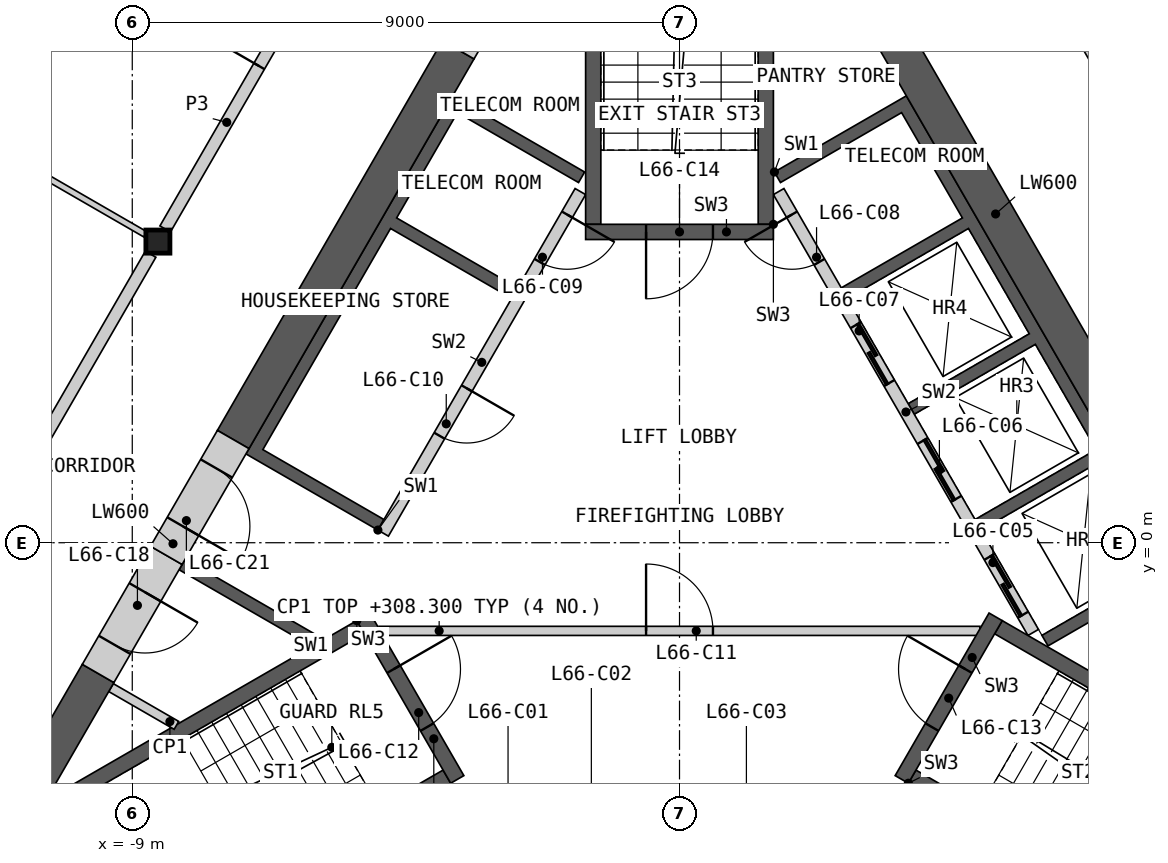
"""IFC4 building model, lengths in metres.
Left out: names, types, materials, properties, quantities, classifications, styles, units other than length and angle.
Written with IfcOpenShell. Run it as: python <this file> out.ifc"""

import sys

from ifc_helpers import new_model, si_unit, direction, frame, frame_2d, origin, origin_2d, place, context, subcontext, project, spatial, polyline, rectangle, i_section, outline, extrude, element, fill, save


model = new_model("IFC4")
c1 = context("Model", 3, precision=1e-05, world=origin(), true_north=direction((0.0, 1.0)))
c2 = subcontext(c1, "Body", "Model", "MODEL_VIEW")
j1 = project(units=[si_unit("LENGTHUNIT", "METRE"), si_unit("PLANEANGLEUNIT", "RADIAN")], contexts=[c1])
p1 = place(None, origin())
s1 = spatial("IfcSite", under=j1, at=p1, CompositionType="ELEMENT")
p2 = place(p1, origin())
s2 = spatial("IfcBuilding", under=s1, at=p2, CompositionType="ELEMENT")
p3 = place(p2, frame((0.0, 0.0, 305.2)))
s3 = spatial("IfcBuildingStorey", under=s2, at=p3, CompositionType="ELEMENT", Elevation=305.2)
p4 = place(p3, frame((-8.578, 4.953, 0.0), z_axis=(0.0, 0.0, 1.0), x_axis=(1.0, 0.0, 0.0)))
e1 = element("IfcColumn", 1, at=p4, inside=s3, PredefinedType="COLUMN", context=c2, shape_type="SweptSolid", body=[
    extrude(i_section(OverallWidth=0.396, OverallDepth=0.381, WebThickness=0.019, FlangeThickness=0.03, at=origin_2d()), origin(), (0.0, 0.0, 1.0), 3.4),
])
p5 = place(p3, origin())
e2 = element("IfcWall", 2, at=p5, inside=s3, PredefinedType="SHEAR", context=c2, shape_type="SweptSolid", body=[
    extrude(outline(polyline([(1.561, 6.097), (3.731, 7.35), (8.231, -0.444), (6.061, -1.697), (5.96, -1.524), (7.952, -0.374), (6.952, 1.358), (4.96, 0.208), (4.861, 0.381), (6.852, 1.531), (5.852, 3.263), (3.861, 2.113), (3.76, 2.287), (5.752, 3.437), (4.752, 5.169), (2.76, 4.019), (2.66, 4.192), (4.652, 5.342), (3.652, 7.074), (1.66, 5.924), (1.561, 6.097)])), origin(), (0.0, 0.0, 1.0), 3.1),
])
p6 = place(p3, frame((5.817, -1.476, 0.0), z_axis=(0.0, 0.0, 1.0), x_axis=(-0.500002616675, 0.866023893041, 0.0)))
e3 = element("IfcWall", 3, at=p6, inside=s3, PredefinedType="SOLIDWALL", context=c2, shape_type="SweptSolid", body=[
    extrude(rectangle(XDim=8.373, YDim=0.2, at=frame_2d((4.187, 0.0))), origin(), (0.0, 0.0, 1.0), 3.1),
])
p7 = place(p6, frame((0.337, 0.0, 0.0)))
e4 = element("IfcOpeningElement", 4, at=p7, cuts=e3, PredefinedType="OPENING", context=c2, shape_type="SweptSolid", body=[
    extrude(rectangle(XDim=1.1, YDim=2.1, at=frame_2d((0.55, 1.05))), frame((0.0, 0.11, 0.0), z_axis=(0.0, -1.0, 0.0), x_axis=(1.0, 0.0, 0.0)), (0.0, 0.0, 1.0), 0.22),
])
p8 = place(p6, frame((2.537, 0.0, 0.0)))
e5 = element("IfcOpeningElement", 5, at=p8, cuts=e3, PredefinedType="OPENING", context=c2, shape_type="SweptSolid", body=[
    extrude(rectangle(XDim=1.1, YDim=2.1, at=frame_2d((0.55, 1.05))), frame((0.0, 0.11, 0.0), z_axis=(0.0, -1.0, 0.0), x_axis=(1.0, 0.0, 0.0)), (0.0, 0.0, 1.0), 0.22),
])
p9 = place(p6, frame((4.737, 0.0, 0.0)))
e6 = element("IfcOpeningElement", 6, at=p9, cuts=e3, PredefinedType="OPENING", context=c2, shape_type="SweptSolid", body=[
    extrude(rectangle(XDim=1.1, YDim=2.1, at=frame_2d((0.55, 1.05))), frame((0.0, 0.11, 0.0), z_axis=(0.0, -1.0, 0.0), x_axis=(1.0, 0.0, 0.0)), (0.0, 0.0, 1.0), 0.22),
])
p10 = place(p6, frame((7.037, 0.0, 0.0)))
e7 = element("IfcOpeningElement", 7, at=p10, cuts=e3, PredefinedType="OPENING", context=c2, shape_type="SweptSolid", body=[
    extrude(rectangle(XDim=0.9, YDim=2.1, at=frame_2d((0.45, 1.05))), frame((0.0, 0.11, 0.0), z_axis=(0.0, -1.0, 0.0), x_axis=(1.0, 0.0, 0.0)), (0.0, 0.0, 1.0), 0.22),
])
p11 = place(p3, origin())
e8 = element("IfcWall", 8, at=p11, inside=s3, PredefinedType="SHEAR", context=c2, shape_type="SweptSolid", body=[
    extrude(outline(polyline([(-6.061, -1.697), (-8.231, -0.444), (-8.131, -0.271), (-5.96, -1.524), (-6.061, -1.697)])), origin(), (0.0, 0.0, 1.0), 3.1),
])
p12 = place(p3, origin())
e9 = element("IfcWall", 9, at=p12, inside=s3, PredefinedType="SHEAR", context=c2, shape_type="SweptSolid", body=[
    extrude(outline(polyline([(-4.96, 0.208), (-7.131, 1.461), (-3.731, 7.35), (-1.561, 6.097), (-1.66, 5.924), (-3.652, 7.074), (-4.652, 5.342), (-2.66, 4.192), (-2.76, 4.019), (-4.752, 5.169), (-6.852, 1.531), (-4.861, 0.381), (-4.96, 0.208)])), origin(), (0.0, 0.0, 1.0), 3.1),
])
p13 = place(p3, frame((-1.631, 5.776, 0.0), z_axis=(0.0, 0.0, 1.0), x_axis=(-0.499992876559, -0.866029516466, 0.0)))
e10 = element("IfcWall", 10, at=p13, inside=s3, PredefinedType="SOLIDWALL", context=c2, shape_type="SweptSolid", body=[
    extrude(rectangle(XDim=6.486, YDim=0.2, at=frame_2d((3.243, 0.0))), origin(), (0.0, 0.0, 1.0), 3.1),
])
p14 = place(p13, frame((0.437, 0.0, 0.0)))
e11 = element("IfcOpeningElement", 11, at=p14, cuts=e10, PredefinedType="OPENING", context=c2, shape_type="SweptSolid", body=[
    extrude(rectangle(XDim=0.9, YDim=2.1, at=frame_2d((0.45, 1.05))), frame((0.0, 0.11, 0.0), z_axis=(0.0, -1.0, 0.0), x_axis=(1.0, 0.0, 0.0)), (0.0, 0.0, 1.0), 0.22),
])
p15 = place(p13, frame((3.737, 0.0, 0.0)))
e12 = element("IfcOpeningElement", 12, at=p15, cuts=e10, PredefinedType="OPENING", context=c2, shape_type="SweptSolid", body=[
    extrude(rectangle(XDim=0.9, YDim=2.1, at=frame_2d((0.45, 1.05))), frame((0.0, 0.11, 0.0), z_axis=(0.0, -1.0, 0.0), x_axis=(1.0, 0.0, 0.0)), (0.0, 0.0, 1.0), 0.22),
])
p16 = place(p3, frame((-4.941, -1.45, 0.0), z_axis=(0.0, 0.0, 1.0), x_axis=(1.0, 0.0, 0.0)))
e13 = element("IfcWall", 13, at=p16, inside=s3, PredefinedType="PARTITIONING", context=c2, shape_type="SweptSolid", body=[
    extrude(rectangle(XDim=9.882, YDim=0.15, at=frame_2d((4.941, 0.0))), origin(), (0.0, 0.0, 1.0), 3.1),
])
p17 = place(p16, frame((4.391, 0.0, 0.0)))
e14 = element("IfcOpeningElement", 14, at=p17, cuts=e13, PredefinedType="OPENING", context=c2, shape_type="SweptSolid", body=[
    extrude(rectangle(XDim=1.1, YDim=2.1, at=frame_2d((0.55, 1.05))), frame((0.0, 0.085, 0.0), z_axis=(0.0, -1.0, 0.0), x_axis=(1.0, 0.0, 0.0)), (0.0, 0.0, 1.0), 0.17),
])
p18 = place(p3, origin())
e15 = element("IfcWall", 15, at=p18, inside=s3, PredefinedType="SHEAR", context=c2, shape_type="SweptSolid", body=[
    extrude(outline(polyline([(-5.307, -1.281), (-10.374, -4.206), (-10.032, -4.298), (-5.182, -1.498), (-5.307, -1.281)])), origin(), (0.0, 0.0, 1.0), 3.1),
])
p19 = place(p3, origin())
e16 = element("IfcWall", 16, at=p19, inside=s3, PredefinedType="SHEAR", context=c2, shape_type="SweptSolid", body=[
    extrude(outline(polyline([(-8.738, -6.539), (-8.83, -6.881), (-3.763, -3.956), (-3.888, -3.739), (-8.738, -6.539)])), origin(), (0.0, 0.0, 1.0), 3.1),
])
p20 = place(p3, frame((-5.199, -1.219, 0.0), z_axis=(0.0, 0.0, 1.0), x_axis=(0.499982516597, -0.866035497597, 0.0)))
e17 = element("IfcWall", 17, at=p20, inside=s3, PredefinedType="SHEAR", context=c2, shape_type="SweptSolid", body=[
    extrude(rectangle(XDim=3.088, YDim=0.25, at=frame_2d((1.544, 0.0))), origin(), (0.0, 0.0, 1.0), 3.1),
])
p21 = place(p20, frame((0.994, 0.0, 0.0)))
e18 = element("IfcOpeningElement", 18, at=p21, cuts=e17, PredefinedType="OPENING", context=c2, shape_type="SweptSolid", body=[
    extrude(rectangle(XDim=1.1, YDim=2.1, at=frame_2d((0.55, 1.05))), frame((0.0, 0.135, 0.0), z_axis=(0.0, -1.0, 0.0), x_axis=(1.0, 0.0, 0.0)), (0.0, 0.0, 1.0), 0.27),
])
p22 = place(p3, origin())
e19 = element("IfcWall", 19, at=p22, inside=s3, PredefinedType="SHEAR", context=c2, shape_type="SweptSolid", body=[
    extrude(outline(polyline([(3.763, -3.956), (8.83, -6.881), (8.738, -6.539), (3.888, -3.739), (3.763, -3.956)])), origin(), (0.0, 0.0, 1.0), 3.1),
])
p23 = place(p3, origin())
e20 = element("IfcWall", 20, at=p23, inside=s3, PredefinedType="SHEAR", context=c2, shape_type="SweptSolid", body=[
    extrude(outline(polyline([(10.032, -4.298), (10.374, -4.206), (5.307, -1.281), (5.182, -1.498), (10.032, -4.298)])), origin(), (0.0, 0.0, 1.0), 3.1),
])
p24 = place(p3, frame((3.655, -3.893, 0.0), z_axis=(0.0, 0.0, 1.0), x_axis=(0.499982516597, 0.866035497597, 0.0)))
e21 = element("IfcWall", 21, at=p24, inside=s3, PredefinedType="SHEAR", context=c2, shape_type="SweptSolid", body=[
    extrude(rectangle(XDim=3.088, YDim=0.25, at=frame_2d((1.544, 0.0))), origin(), (0.0, 0.0, 1.0), 3.1),
])
p25 = place(p24, frame((0.994, 0.0, 0.0)))
e22 = element("IfcOpeningElement", 22, at=p25, cuts=e21, PredefinedType="OPENING", context=c2, shape_type="SweptSolid", body=[
    extrude(rectangle(XDim=1.1, YDim=2.1, at=frame_2d((0.55, 1.05))), frame((0.0, 0.135, 0.0), z_axis=(0.0, -1.0, 0.0), x_axis=(1.0, 0.0, 0.0)), (0.0, 0.0, 1.0), 0.27),
])
p26 = place(p3, origin())
e23 = element("IfcWall", 23, at=p26, inside=s3, PredefinedType="SHEAR", context=c2, shape_type="SweptSolid", body=[
    extrude(outline(polyline([(1.544, 5.237), (1.544, 11.087), (1.294, 10.837), (1.294, 5.237), (1.544, 5.237)])), origin(), (0.0, 0.0, 1.0), 3.1),
])
p27 = place(p3, origin())
e24 = element("IfcWall", 24, at=p27, inside=s3, PredefinedType="SHEAR", context=c2, shape_type="SweptSolid", body=[
    extrude(outline(polyline([(-1.294, 10.837), (-1.544, 11.087), (-1.544, 5.237), (-1.294, 5.237), (-1.294, 10.837)])), origin(), (0.0, 0.0, 1.0), 3.1),
])
p28 = place(p3, frame((1.544, 5.112, 0.0), z_axis=(0.0, 0.0, 1.0), x_axis=(-1.0, 0.0, 0.0)))
e25 = element("IfcWall", 25, at=p28, inside=s3, PredefinedType="SHEAR", context=c2, shape_type="SweptSolid", body=[
    extrude(rectangle(XDim=3.088, YDim=0.25, at=frame_2d((1.544, 0.0))), origin(), (0.0, 0.0, 1.0), 3.1),
])
p29 = place(p28, frame((0.994, 0.0, 0.0)))
e26 = element("IfcOpeningElement", 26, at=p29, cuts=e25, PredefinedType="OPENING", context=c2, shape_type="SweptSolid", body=[
    extrude(rectangle(XDim=1.1, YDim=2.1, at=frame_2d((0.55, 1.05))), frame((0.0, 0.135, 0.0), z_axis=(0.0, -1.0, 0.0), x_axis=(1.0, 0.0, 0.0)), (0.0, 0.0, 1.0), 0.27),
])
p30 = place(p3, frame((-9.35, -2.383, 0.0), z_axis=(0.0, 0.0, 1.0), x_axis=(0.866057962423, -0.499943602543, 0.0)))
e27 = element("IfcWall", 27, at=p30, inside=s3, PredefinedType="PARTITIONING", context=c2, shape_type="SweptSolid", body=[
    extrude(rectangle(XDim=1.242, YDim=0.15, at=frame_2d((0.621, 0.0))), origin(), (0.0, 0.0, 1.0), 3.1),
])
p31 = place(p3, frame((8.841, -0.902, 0.0), z_axis=(0.0, 0.0, 1.0), x_axis=(-0.499995618375, 0.866027933502, 0.0)))
e28 = element("IfcWall", 28, at=p31, inside=s3, PredefinedType="SHEAR", context=c2, shape_type="SweptSolid", body=[
    extrude(rectangle(XDim=14.571, YDim=0.6, at=frame_2d((7.285, 0.0))), origin(), (0.0, 0.0, 1.0), 3.1),
])
p32 = place(p3, frame((-3.639, 8.107, 0.0), z_axis=(0.0, 0.0, 1.0), x_axis=(-0.49999180351, -0.866030135978, 0.0)))
e29 = element("IfcWall", 29, at=p32, inside=s3, PredefinedType="SHEAR", context=c2, shape_type="SweptSolid", body=[
    extrude(rectangle(XDim=7.401, YDim=0.6, at=frame_2d((3.701, 0.0))), origin(), (0.0, 0.0, 1.0), 3.1),
])
p33 = place(p3, frame((-9.562, -2.15, 0.0), z_axis=(0.0, 0.0, 1.0), x_axis=(-0.500015214976, -0.866016619236, 0.0)))
e30 = element("IfcWall", 30, at=p33, inside=s3, PredefinedType="SHEAR", context=c2, shape_type="SweptSolid", body=[
    extrude(rectangle(XDim=5.318, YDim=0.6, at=frame_2d((2.659, 0.0))), origin(), (0.0, 0.0, 1.0), 3.1),
])
p34 = place(p3, frame((-8.44, -0.208, 0.0), z_axis=(0.0, 0.0, 1.0), x_axis=(-0.500001951578, -0.866024277037, 0.0)))
e31 = element("IfcWall", 31, at=p34, inside=s3, PredefinedType="SHEAR", context=c2, shape_type="SweptSolid", body=[
    extrude(rectangle(XDim=2.243, YDim=0.6, at=frame_2d((1.122, 0.0))), origin(), (0.0, 0.0, 1.0), 3.1),
])
p35 = place(p34, frame((0.7, 0.0, 0.0)))
e32 = element("IfcOpeningElement", 32, at=p35, cuts=e31, PredefinedType="OPENING", context=c2, shape_type="SweptSolid", body=[
    extrude(rectangle(XDim=1.0, YDim=2.1, at=frame_2d((0.5, 1.05))), frame((0.0, 0.31, 0.0), z_axis=(0.0, -1.0, 0.0), x_axis=(1.0, 0.0, 0.0)), (0.0, 0.0, 1.0), 0.62),
])
p36 = place(p3, frame((-2.539, 10.013, 0.0), z_axis=(0.0, 0.0, 1.0), x_axis=(-0.50002983664, -0.866008176907, 0.0)))
e33 = element("IfcWall", 33, at=p36, inside=s3, PredefinedType="SHEAR", context=c2, shape_type="SweptSolid", body=[
    extrude(rectangle(XDim=2.2, YDim=0.6, at=frame_2d((1.1, 0.0))), origin(), (0.0, 0.0, 1.0), 3.1),
])
p37 = place(p36, frame((0.6, 0.0, 0.0)))
e34 = element("IfcOpeningElement", 34, at=p37, cuts=e33, PredefinedType="OPENING", context=c2, shape_type="SweptSolid", body=[
    extrude(rectangle(XDim=1.0, YDim=2.1, at=frame_2d((0.5, 1.05))), frame((0.0, 0.31, 0.0), z_axis=(0.0, -1.0, 0.0), x_axis=(1.0, 0.0, 0.0)), (0.0, 0.0, 1.0), 0.62),
])
p38 = place(p3, frame((-7.34, 1.698, 0.0), z_axis=(0.0, 0.0, 1.0), x_axis=(-0.50002983664, -0.866008176907, 0.0)))
e35 = element("IfcWall", 35, at=p38, inside=s3, PredefinedType="SHEAR", context=c2, shape_type="SweptSolid", body=[
    extrude(rectangle(XDim=2.2, YDim=0.6, at=frame_2d((1.1, 0.0))), origin(), (0.0, 0.0, 1.0), 3.1),
])
p39 = place(p38, frame((0.55, 0.0, 0.0)))
e36 = element("IfcOpeningElement", 36, at=p39, cuts=e35, PredefinedType="OPENING", context=c2, shape_type="SweptSolid", body=[
    extrude(rectangle(XDim=1.1, YDim=2.1, at=frame_2d((0.55, 1.05))), frame((0.0, 0.31, 0.0), z_axis=(0.0, -1.0, 0.0), x_axis=(1.0, 0.0, 0.0)), (0.0, 0.0, 1.0), 0.62),
])
p40 = place(p3, frame((4.409, 12.174, 0.0), z_axis=(0.0, 0.0, 1.0), x_axis=(0.499984266882, -0.866034487114, 0.0)))
e37 = element("IfcWall", 37, at=p40, inside=s3, PredefinedType="PARTITIONING", context=c2, shape_type="SweptSolid", body=[
    extrude(rectangle(XDim=8.099, YDim=0.2, at=frame_2d((4.049, 0.0))), origin(), (0.0, 0.0, 1.0), 3.1),
])
p41 = place(p40, frame((5.123, 0.0, 0.0)))
e38 = element("IfcOpeningElement", 38, at=p41, cuts=e37, PredefinedType="OPENING", context=c2, shape_type="SweptSolid", body=[
    extrude(rectangle(XDim=1.0, YDim=2.1, at=frame_2d((0.5, 1.05))), frame((0.0, 0.11, 0.0), z_axis=(0.0, -1.0, 0.0), x_axis=(1.0, 0.0, 0.0)), (0.0, 0.0, 1.0), 0.22),
])
p42 = place(p40, frame((1.164, 0.0, 0.0)))
e39 = element("IfcOpeningElement", 39, at=p42, cuts=e37, PredefinedType="OPENING", context=c2, shape_type="SweptSolid", body=[
    extrude(rectangle(XDim=1.0, YDim=2.1, at=frame_2d((0.5, 1.05))), frame((0.0, 0.11, 0.0), z_axis=(0.0, -1.0, 0.0), x_axis=(1.0, 0.0, 0.0)), (0.0, 0.0, 1.0), 0.22),
])
p43 = place(p3, frame((-8.458, 5.16, 0.0), z_axis=(0.0, 0.0, 1.0), x_axis=(0.499984266882, 0.866034487114, 0.0)))
e40 = element("IfcWall", 40, at=p43, inside=s3, PredefinedType="PARTITIONING", context=c2, shape_type="SweptSolid", body=[
    extrude(rectangle(XDim=8.099, YDim=0.2, at=frame_2d((4.049, 0.0))), origin(), (0.0, 0.0, 1.0), 3.1),
])
p44 = place(p43, frame((3.093, 0.0, 0.0)))
e41 = element("IfcOpeningElement", 41, at=p44, cuts=e40, PredefinedType="OPENING", context=c2, shape_type="SweptSolid", body=[
    extrude(rectangle(XDim=1.0, YDim=2.1, at=frame_2d((0.5, 1.05))), frame((0.0, 0.11, 0.0), z_axis=(0.0, -1.0, 0.0), x_axis=(1.0, 0.0, 0.0)), (0.0, 0.0, 1.0), 0.22),
])
p45 = place(p3, frame((-12.748, -2.269, 0.0), z_axis=(0.0, 0.0, 1.0), x_axis=(0.499984266882, 0.866034487114, 0.0)))
e42 = element("IfcWall", 42, at=p45, inside=s3, PredefinedType="PARTITIONING", context=c2, shape_type="SweptSolid", body=[
    extrude(rectangle(XDim=8.099, YDim=0.2, at=frame_2d((4.049, 0.0))), origin(), (0.0, 0.0, 1.0), 3.1),
])
p46 = place(p45, frame((1.164, 0.0, 0.0)))
e43 = element("IfcOpeningElement", 43, at=p46, cuts=e42, PredefinedType="OPENING", context=c2, shape_type="SweptSolid", body=[
    extrude(rectangle(XDim=1.0, YDim=2.1, at=frame_2d((0.5, 1.05))), frame((0.0, 0.11, 0.0), z_axis=(0.0, -1.0, 0.0), x_axis=(1.0, 0.0, 0.0)), (0.0, 0.0, 1.0), 0.22),
])
p47 = place(p3, frame((-16.054, 3.419, 0.0), z_axis=(0.0, 0.0, 1.0), x_axis=(0.499999256795, 0.866025832873, 0.0)))
e44 = element("IfcWall", 44, at=p47, inside=s3, PredefinedType="PARTITIONING", context=c2, shape_type="SweptSolid", body=[
    extrude(rectangle(XDim=15.448, YDim=0.1, at=frame_2d((7.724, 0.0))), origin(), (0.0, 0.0, 1.0), 2.33),
])
p48 = place(p47, frame((8.306, 0.0, 0.0)))
e45 = element("IfcOpeningElement", 45, at=p48, cuts=e44, PredefinedType="OPENING", context=c2, shape_type="SweptSolid", body=[
    extrude(rectangle(XDim=0.95, YDim=2.1, at=frame_2d((0.475, 1.05))), frame((0.0, 0.06, 0.0), z_axis=(0.0, -1.0, 0.0), x_axis=(1.0, 0.0, 0.0)), (0.0, 0.0, 1.0), 0.12),
])
p49 = place(p47, frame((1.76, 0.0, 0.0)))
e46 = element("IfcOpeningElement", 46, at=p49, cuts=e44, PredefinedType="OPENING", context=c2, shape_type="SweptSolid", body=[
    extrude(rectangle(XDim=0.95, YDim=2.1, at=frame_2d((0.475, 1.05))), frame((0.0, 0.06, 0.0), z_axis=(0.0, -1.0, 0.0), x_axis=(1.0, 0.0, 0.0)), (0.0, 0.0, 1.0), 0.12),
])
p50 = place(p3, frame((-19.615, 11.325, 0.0), z_axis=(0.0, 0.0, 1.0), x_axis=(0.86602139559, -0.500006942333, 0.0)))
e47 = element("IfcWall", 47, at=p50, inside=s3, PredefinedType="PARTITIONING", context=c2, shape_type="SweptSolid", body=[
    extrude(rectangle(XDim=12.505, YDim=0.1, at=frame_2d((6.252, 0.0))), origin(), (0.0, 0.0, 1.0), 2.33),
])
p51 = place(p50, frame((4.37, 0.0, 0.0)))
e48 = element("IfcOpeningElement", 48, at=p51, cuts=e47, PredefinedType="OPENING", context=c2, shape_type="SweptSolid", body=[
    extrude(rectangle(XDim=0.95, YDim=2.1, at=frame_2d((0.475, 1.05))), frame((0.0, 0.06, 0.0), z_axis=(0.0, -1.0, 0.0), x_axis=(1.0, 0.0, 0.0)), (0.0, 0.0, 1.0), 0.12),
])
p52 = place(p7, origin())
e49 = element("IfcDoor", 49, at=p52, inside=s3, OperationType="SLIDING_TO_LEFT", PredefinedType="DOOR", context=c2, shape_type="SweptSolid", body=[
    extrude(rectangle(XDim=1.1, YDim=2.1, at=frame_2d((0.55, 1.05))), frame((0.0, 0.025, 0.0), z_axis=(0.0, -1.0, 0.0), x_axis=(1.0, 0.0, 0.0)), (0.0, 0.0, 1.0), 0.05),
])
fill(e4, e49)
p53 = place(p8, origin())
e50 = element("IfcDoor", 50, at=p53, inside=s3, OperationType="SLIDING_TO_LEFT", PredefinedType="DOOR", context=c2, shape_type="SweptSolid", body=[
    extrude(rectangle(XDim=1.1, YDim=2.1, at=frame_2d((0.55, 1.05))), frame((0.0, 0.025, 0.0), z_axis=(0.0, -1.0, 0.0), x_axis=(1.0, 0.0, 0.0)), (0.0, 0.0, 1.0), 0.05),
])
fill(e5, e50)
p54 = place(p9, origin())
e51 = element("IfcDoor", 51, at=p54, inside=s3, OperationType="SLIDING_TO_LEFT", PredefinedType="DOOR", context=c2, shape_type="SweptSolid", body=[
    extrude(rectangle(XDim=1.1, YDim=2.1, at=frame_2d((0.55, 1.05))), frame((0.0, 0.025, 0.0), z_axis=(0.0, -1.0, 0.0), x_axis=(1.0, 0.0, 0.0)), (0.0, 0.0, 1.0), 0.05),
])
fill(e6, e51)
p55 = place(p10, origin())
e52 = element("IfcDoor", 52, at=p55, inside=s3, OperationType="SINGLE_SWING_RIGHT", PredefinedType="DOOR", context=c2, shape_type="SweptSolid", body=[
    extrude(rectangle(XDim=0.9, YDim=2.1, at=frame_2d((0.45, 1.05))), frame((0.0, 0.025, 0.0), z_axis=(0.0, -1.0, 0.0), x_axis=(1.0, 0.0, 0.0)), (0.0, 0.0, 1.0), 0.05),
])
fill(e7, e52)
p56 = place(p14, origin())
e53 = element("IfcDoor", 53, at=p56, inside=s3, OperationType="SINGLE_SWING_LEFT", PredefinedType="DOOR", context=c2, shape_type="SweptSolid", body=[
    extrude(rectangle(XDim=0.9, YDim=2.1, at=frame_2d((0.45, 1.05))), frame((0.0, 0.025, 0.0), z_axis=(0.0, -1.0, 0.0), x_axis=(1.0, 0.0, 0.0)), (0.0, 0.0, 1.0), 0.05),
])
fill(e11, e53)
p57 = place(p15, origin())
e54 = element("IfcDoor", 54, at=p57, inside=s3, OperationType="SINGLE_SWING_LEFT", PredefinedType="DOOR", context=c2, shape_type="SweptSolid", body=[
    extrude(rectangle(XDim=0.9, YDim=2.1, at=frame_2d((0.45, 1.05))), frame((0.0, 0.025, 0.0), z_axis=(0.0, -1.0, 0.0), x_axis=(1.0, 0.0, 0.0)), (0.0, 0.0, 1.0), 0.05),
])
fill(e12, e54)
p58 = place(p17, origin())
e55 = element("IfcDoor", 55, at=p58, inside=s3, OperationType="SINGLE_SWING_LEFT", PredefinedType="DOOR", context=c2, shape_type="SweptSolid", body=[
    extrude(rectangle(XDim=1.1, YDim=2.1, at=frame_2d((0.55, 1.05))), frame((0.0, 0.025, 0.0), z_axis=(0.0, -1.0, 0.0), x_axis=(1.0, 0.0, 0.0)), (0.0, 0.0, 1.0), 0.05),
])
fill(e14, e55)
p59 = place(p21, origin())
e56 = element("IfcDoor", 56, at=p59, inside=s3, OperationType="SINGLE_SWING_LEFT", PredefinedType="DOOR", context=c2, shape_type="SweptSolid", body=[
    extrude(rectangle(XDim=1.1, YDim=2.1, at=frame_2d((0.55, 1.05))), frame((0.0, 0.025, 0.0), z_axis=(0.0, -1.0, 0.0), x_axis=(1.0, 0.0, 0.0)), (0.0, 0.0, 1.0), 0.05),
])
fill(e18, e56)
p60 = place(p25, origin())
e57 = element("IfcDoor", 57, at=p60, inside=s3, OperationType="SINGLE_SWING_RIGHT", PredefinedType="DOOR", context=c2, shape_type="SweptSolid", body=[
    extrude(rectangle(XDim=1.1, YDim=2.1, at=frame_2d((0.55, 1.05))), frame((0.0, 0.025, 0.0), z_axis=(0.0, -1.0, 0.0), x_axis=(1.0, 0.0, 0.0)), (0.0, 0.0, 1.0), 0.05),
])
fill(e22, e57)
p61 = place(p29, origin())
e58 = element("IfcDoor", 58, at=p61, inside=s3, OperationType="SINGLE_SWING_RIGHT", PredefinedType="DOOR", context=c2, shape_type="SweptSolid", body=[
    extrude(rectangle(XDim=1.1, YDim=2.1, at=frame_2d((0.55, 1.05))), frame((0.0, 0.025, 0.0), z_axis=(0.0, -1.0, 0.0), x_axis=(1.0, 0.0, 0.0)), (0.0, 0.0, 1.0), 0.05),
])
fill(e26, e58)
p62 = place(p35, origin())
e59 = element("IfcDoor", 59, at=p62, inside=s3, OperationType="SINGLE_SWING_LEFT", PredefinedType="DOOR", context=c2, shape_type="SweptSolid", body=[
    extrude(rectangle(XDim=1.0, YDim=2.1, at=frame_2d((0.5, 1.05))), frame((0.0, 0.055, 0.0), z_axis=(0.0, -1.0, 0.0), x_axis=(1.0, 0.0, 0.0)), (0.0, 0.0, 1.0), 0.05),
])
fill(e32, e59)
p63 = place(p39, origin())
e60 = element("IfcDoor", 60, at=p63, inside=s3, OperationType="SINGLE_SWING_RIGHT", PredefinedType="DOOR", context=c2, shape_type="SweptSolid", body=[
    extrude(rectangle(XDim=1.1, YDim=2.1, at=frame_2d((0.55, 1.05))), frame((0.0, 0.055, 0.0), z_axis=(0.0, -1.0, 0.0), x_axis=(1.0, 0.0, 0.0)), (0.0, 0.0, 1.0), 0.05),
])
fill(e36, e60)
p64 = place(p44, origin())
e61 = element("IfcDoor", 61, at=p64, inside=s3, OperationType="SINGLE_SWING_LEFT", PredefinedType="DOOR", context=c2, shape_type="SweptSolid", body=[
    extrude(rectangle(XDim=1.0, YDim=2.1, at=frame_2d((0.5, 1.05))), frame((0.0, 0.025, 0.0), z_axis=(0.0, -1.0, 0.0), x_axis=(1.0, 0.0, 0.0)), (0.0, 0.0, 1.0), 0.05),
])
fill(e41, e61)
save(model, sys.argv[1])
